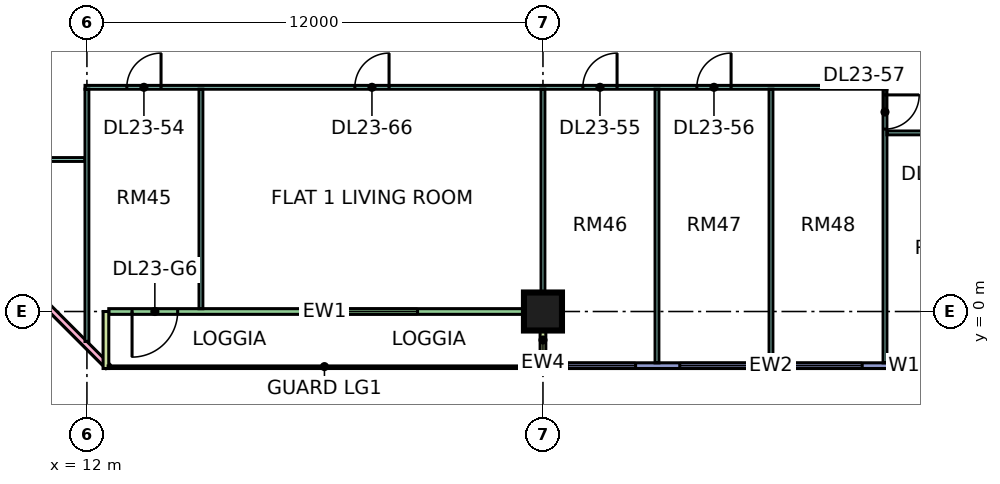
"""IFC4 building model, lengths in metres.
Left out: names, types, materials, properties, quantities, classifications, styles, units other than length and angle.
Written with IfcOpenShell. Run it as: python <this file> out.ifc"""

import sys

from ifc_helpers import new_model, si_unit, direction, frame, frame_2d, origin, origin_2d, place, context, subcontext, project, spatial, rectangle, extrude, element, fill, save


model = new_model("IFC4")
c1 = context("Model", 3, precision=1e-05, world=origin(), true_north=direction((0.0, 1.0)))
c2 = subcontext(c1, "Body", "Model", "MODEL_VIEW")
j1 = project(units=[si_unit("LENGTHUNIT", "METRE"), si_unit("PLANEANGLEUNIT", "RADIAN")], contexts=[c1])
p1 = place(None, origin())
s1 = spatial("IfcSite", under=j1, at=p1, CompositionType="ELEMENT")
p2 = place(p1, origin())
s2 = spatial("IfcBuilding", under=s1, at=p2, CompositionType="ELEMENT")
p3 = place(p2, frame((0.0, 0.0, 103.15)))
s3 = spatial("IfcBuildingStorey", under=s2, at=p3, CompositionType="ELEMENT", Elevation=103.15)
p4 = place(p3, frame((24.0, 0.0, 0.0), z_axis=(0.0, 0.0, 1.0), x_axis=(1.0, 0.0, 0.0)))
e1 = element("IfcColumn", 1, at=p4, inside=s3, PredefinedType="COLUMN", context=c2, shape_type="SweptSolid", body=[
    extrude(rectangle(XDim=1.0, YDim=1.0, at=origin_2d()), origin(), (0.0, 0.0, 1.0), 3.75),
])
p5 = place(p3, frame((-1.447, 12.553, 0.0), z_axis=(0.0, 0.0, 1.0), x_axis=(0.707106781187, -0.707106781187, 0.0)))
e2 = element("IfcWall", 2, at=p5, inside=s3, PredefinedType="SOLIDWALL", context=c2, shape_type="SweptSolid", body=[
    extrude(rectangle(XDim=19.799, YDim=0.15, at=frame_2d((9.899, 0.0))), origin(), (0.0, 0.0, 1.0), 3.35),
])
p6 = place(p5, frame((2.212, 0.0, 0.45)))
e3 = element("IfcOpeningElement", 3, at=p6, cuts=e2, PredefinedType="OPENING", context=c2, shape_type="SweptSolid", body=[
    extrude(rectangle(XDim=3.0, YDim=2.4, at=frame_2d((1.5, 1.2))), frame((0.0, 0.085, 0.0), z_axis=(0.0, -1.0, 0.0), x_axis=(1.0, 0.0, 0.0)), (0.0, 0.0, 1.0), 0.17),
])
p7 = place(p5, frame((10.216, 0.0, 0.45)))
e4 = element("IfcOpeningElement", 4, at=p7, cuts=e2, PredefinedType="OPENING", context=c2, shape_type="SweptSolid", body=[
    extrude(rectangle(XDim=3.0, YDim=2.4, at=frame_2d((1.5, 1.2))), frame((0.0, 0.085, 0.0), z_axis=(0.0, -1.0, 0.0), x_axis=(1.0, 0.0, 0.0)), (0.0, 0.0, 1.0), 0.17),
])
p8 = place(p3, frame((12.575, 0.0, 0.0), z_axis=(0.0, 0.0, 1.0), x_axis=(1.0, 0.0, 0.0)))
e5 = element("IfcWall", 5, at=p8, inside=s3, PredefinedType="SOLIDWALL", context=c2, shape_type="SweptSolid", body=[
    extrude(rectangle(XDim=11.35, YDim=0.15, at=frame_2d((5.675, 0.0))), origin(), (0.0, 0.0, 1.0), 3.35),
])
p9 = place(p8, frame((0.613, 0.0, 0.0)))
e6 = element("IfcOpeningElement", 6, at=p9, cuts=e5, PredefinedType="OPENING", context=c2, shape_type="SweptSolid", body=[
    extrude(rectangle(XDim=1.2, YDim=2.4, at=frame_2d((0.6, 1.2))), frame((0.0, 0.085, 0.0), z_axis=(0.0, -1.0, 0.0), x_axis=(1.0, 0.0, 0.0)), (0.0, 0.0, 1.0), 0.17),
])
p10 = place(p8, frame((5.125, 0.0, 0.45)))
e7 = element("IfcOpeningElement", 7, at=p10, cuts=e5, PredefinedType="OPENING", context=c2, shape_type="SweptSolid", body=[
    extrude(rectangle(XDim=3.0, YDim=2.4, at=frame_2d((1.5, 1.2))), frame((0.0, 0.085, 0.0), z_axis=(0.0, -1.0, 0.0), x_axis=(1.0, 0.0, 0.0)), (0.0, 0.0, 1.0), 0.17),
])
for number, where, z_axis, x_axis in (
    (8, (12.5, -1.5, 0.0), (0.0, 0.0, 1.0), (0.0, 1.0, 0.0)),
    (9, (24.0, -1.5, 0.0), (0.0, 0.0, 1.0), (0.0, 1.0, 0.0)),
):
    element("IfcWall", number, at=place(p3, frame(where, z_axis=z_axis, x_axis=x_axis)), inside=s3, PredefinedType="SOLIDWALL", context=c2, shape_type="SweptSolid", body=[
        extrude(rectangle(XDim=1.5, YDim=0.15, at=frame_2d((0.75, 0.0))), origin(), (0.0, 0.0, 1.0), 3.35),
    ])
p11 = place(p3, frame((24.075, -1.425, 0.0), z_axis=(0.0, 0.0, 1.0), x_axis=(1.0, 0.0, 0.0)))
e10 = element("IfcWall", 10, at=p11, inside=s3, PredefinedType="SOLIDWALL", context=c2, shape_type="SweptSolid", body=[
    extrude(rectangle(XDim=11.85, YDim=0.15, at=frame_2d((5.925, 0.0))), origin(), (0.0, 0.0, 1.0), 3.35),
])
p12 = place(p11, frame((0.562, 0.0, 0.45)))
e11 = element("IfcOpeningElement", 11, at=p12, cuts=e10, PredefinedType="OPENING", context=c2, shape_type="SweptSolid", body=[
    extrude(rectangle(XDim=1.8, YDim=2.4, at=frame_2d((0.9, 1.2))), frame((0.0, 0.085, 0.0), z_axis=(0.0, -1.0, 0.0), x_axis=(1.0, 0.0, 0.0)), (0.0, 0.0, 1.0), 0.17),
])
p13 = place(p11, frame((3.525, 0.0, 0.45)))
e12 = element("IfcOpeningElement", 12, at=p13, cuts=e10, PredefinedType="OPENING", context=c2, shape_type="SweptSolid", body=[
    extrude(rectangle(XDim=1.8, YDim=2.4, at=frame_2d((0.9, 1.2))), frame((0.0, 0.085, 0.0), z_axis=(0.0, -1.0, 0.0), x_axis=(1.0, 0.0, 0.0)), (0.0, 0.0, 1.0), 0.17),
])
p14 = place(p11, frame((6.525, 0.0, 0.45)))
e13 = element("IfcOpeningElement", 13, at=p14, cuts=e10, PredefinedType="OPENING", context=c2, shape_type="SweptSolid", body=[
    extrude(rectangle(XDim=1.8, YDim=2.4, at=frame_2d((0.9, 1.2))), frame((0.0, 0.085, 0.0), z_axis=(0.0, -1.0, 0.0), x_axis=(1.0, 0.0, 0.0)), (0.0, 0.0, 1.0), 0.17),
])
p15 = place(p11, frame((9.488, 0.0, 0.45)))
e14 = element("IfcOpeningElement", 14, at=p15, cuts=e10, PredefinedType="OPENING", context=c2, shape_type="SweptSolid", body=[
    extrude(rectangle(XDim=1.8, YDim=2.4, at=frame_2d((0.9, 1.2))), frame((0.0, 0.085, 0.0), z_axis=(0.0, -1.0, 0.0), x_axis=(1.0, 0.0, 0.0)), (0.0, 0.0, 1.0), 0.17),
])
p16 = place(p3, frame((9.05, 4.0, 0.0), z_axis=(0.0, 0.0, 1.0), x_axis=(1.0, 0.0, 0.0)))
e15 = element("IfcWall", 15, at=p16, inside=s3, PredefinedType="PARTITIONING", context=c2, shape_type="SweptSolid", body=[
    extrude(rectangle(XDim=2.9, YDim=0.1, at=frame_2d((1.45, 0.0))), origin(), (0.0, 0.0, 1.0), 3.35),
])
p17 = place(p3, frame((11.95, 5.9, 0.0), z_axis=(0.0, 0.0, 1.0), x_axis=(1.0, 0.0, 0.0)))
e16 = element("IfcWall", 16, at=p17, inside=s3, PredefinedType="PARTITIONING", context=c2, shape_type="SweptSolid", body=[
    extrude(rectangle(XDim=21.1, YDim=0.1, at=frame_2d((10.55, 0.0))), origin(), (0.0, 0.0, 1.0), 3.35),
])
p18 = place(p17, frame((1.1, 0.0, 0.0)))
e17 = element("IfcOpeningElement", 17, at=p18, cuts=e16, PredefinedType="OPENING", context=c2, shape_type="SweptSolid", body=[
    extrude(rectangle(XDim=0.9, YDim=2.1, at=frame_2d((0.45, 1.05))), frame((0.0, 0.06, 0.0), z_axis=(0.0, -1.0, 0.0), x_axis=(1.0, 0.0, 0.0)), (0.0, 0.0, 1.0), 0.12),
])
p19 = place(p17, frame((13.1, 0.0, 0.0)))
e18 = element("IfcOpeningElement", 18, at=p19, cuts=e16, PredefinedType="OPENING", context=c2, shape_type="SweptSolid", body=[
    extrude(rectangle(XDim=0.9, YDim=2.1, at=frame_2d((0.45, 1.05))), frame((0.0, 0.06, 0.0), z_axis=(0.0, -1.0, 0.0), x_axis=(1.0, 0.0, 0.0)), (0.0, 0.0, 1.0), 0.12),
])
p20 = place(p17, frame((16.1, 0.0, 0.0)))
e19 = element("IfcOpeningElement", 19, at=p20, cuts=e16, PredefinedType="OPENING", context=c2, shape_type="SweptSolid", body=[
    extrude(rectangle(XDim=0.9, YDim=2.1, at=frame_2d((0.45, 1.05))), frame((0.0, 0.06, 0.0), z_axis=(0.0, -1.0, 0.0), x_axis=(1.0, 0.0, 0.0)), (0.0, 0.0, 1.0), 0.12),
])
p21 = place(p17, frame((7.1, 0.0, 0.0)))
e20 = element("IfcOpeningElement", 20, at=p21, cuts=e16, PredefinedType="OPENING", context=c2, shape_type="SweptSolid", body=[
    extrude(rectangle(XDim=0.9, YDim=2.1, at=frame_2d((0.45, 1.05))), frame((0.0, 0.06, 0.0), z_axis=(0.0, -1.0, 0.0), x_axis=(1.0, 0.0, 0.0)), (0.0, 0.0, 1.0), 0.12),
])
p22 = place(p3, frame((12.0, -0.788, 0.0), z_axis=(0.0, 0.0, 1.0), x_axis=(0.0, 1.0, 0.0)))
e21 = element("IfcWall", 21, at=p22, inside=s3, PredefinedType="PARTITIONING", context=c2, shape_type="SweptSolid", body=[
    extrude(rectangle(XDim=6.638, YDim=0.1, at=frame_2d((3.319, 0.0))), origin(), (0.0, 0.0, 1.0), 3.35),
])
p23 = place(p3, frame((15.0, 0.074, 0.0), z_axis=(0.0, 0.0, 1.0), x_axis=(0.0, 1.0, 0.0)))
e22 = element("IfcWall", 22, at=p23, inside=s3, PredefinedType="PARTITIONING", context=c2, shape_type="SweptSolid", body=[
    extrude(rectangle(XDim=5.776, YDim=0.1, at=frame_2d((2.888, 0.0))), origin(), (0.0, 0.0, 1.0), 3.35),
])
p24 = place(p3, frame((24.0, 0.0, 0.0), z_axis=(0.0, 0.0, 1.0), x_axis=(0.0, 1.0, 0.0)))
e23 = element("IfcWall", 23, at=p24, inside=s3, PredefinedType="PARTITIONING", context=c2, shape_type="SweptSolid", body=[
    extrude(rectangle(XDim=5.85, YDim=0.1, at=frame_2d((2.925, 0.0))), origin(), (0.0, 0.0, 1.0), 3.35),
])
for number, where, z_axis, x_axis in (
    (24, (27.0, -1.351, 0.0), (0.0, 0.0, 1.0), (0.0, 1.0, 0.0)),
    (25, (30.0, -1.351, 0.0), (0.0, 0.0, 1.0), (0.0, 1.0, 0.0)),
):
    element("IfcWall", number, at=place(p3, frame(where, z_axis=z_axis, x_axis=x_axis)), inside=s3, PredefinedType="PARTITIONING", context=c2, shape_type="SweptSolid", body=[
        extrude(rectangle(XDim=7.201, YDim=0.1, at=frame_2d((3.601, 0.0))), origin(), (0.0, 0.0, 1.0), 3.35),
    ])
p25 = place(p3, frame((33.0, -1.351, 0.0), z_axis=(0.0, 0.0, 1.0), x_axis=(0.0, 1.0, 0.0)))
e26 = element("IfcWall", 26, at=p25, inside=s3, PredefinedType="PARTITIONING", context=c2, shape_type="SweptSolid", body=[
    extrude(rectangle(XDim=7.201, YDim=0.1, at=frame_2d((3.601, 0.0))), origin(), (0.0, 0.0, 1.0), 3.35),
])
p26 = place(p25, frame((6.151, 0.0, 0.0)))
e27 = element("IfcOpeningElement", 27, at=p26, cuts=e26, PredefinedType="OPENING", context=c2, shape_type="SweptSolid", body=[
    extrude(rectangle(XDim=0.9, YDim=2.1, at=frame_2d((0.45, 1.05))), frame((0.0, 0.06, 0.0), z_axis=(0.0, -1.0, 0.0), x_axis=(1.0, 0.0, 0.0)), (0.0, 0.0, 1.0), 0.12),
])
p27 = place(p3, frame((33.05, 4.7, 0.0), z_axis=(0.0, 0.0, 1.0), x_axis=(1.0, 0.0, 0.0)))
e28 = element("IfcWall", 28, at=p27, inside=s3, PredefinedType="PARTITIONING", context=c2, shape_type="SweptSolid", body=[
    extrude(rectangle(XDim=20.85, YDim=0.1, at=frame_2d((10.425, 0.0))), origin(), (0.0, 0.0, 1.0), 3.35),
])
p28 = place(p27, frame((1.0, 0.0, 0.0)))
e29 = element("IfcOpeningElement", 29, at=p28, cuts=e28, PredefinedType="OPENING", context=c2, shape_type="SweptSolid", body=[
    extrude(rectangle(XDim=0.9, YDim=2.1, at=frame_2d((0.45, 1.05))), frame((0.0, 0.06, 0.0), z_axis=(0.0, -1.0, 0.0), x_axis=(1.0, 0.0, 0.0)), (0.0, 0.0, 1.0), 0.12),
])
p29 = place(p27, frame((4.0, 0.0, 0.0)))
e30 = element("IfcOpeningElement", 30, at=p29, cuts=e28, PredefinedType="OPENING", context=c2, shape_type="SweptSolid", body=[
    extrude(rectangle(XDim=0.9, YDim=2.1, at=frame_2d((0.45, 1.05))), frame((0.0, 0.06, 0.0), z_axis=(0.0, -1.0, 0.0), x_axis=(1.0, 0.0, 0.0)), (0.0, 0.0, 1.0), 0.12),
])
p30 = place(p27, frame((7.0, 0.0, 0.0)))
e31 = element("IfcOpeningElement", 31, at=p30, cuts=e28, PredefinedType="OPENING", context=c2, shape_type="SweptSolid", body=[
    extrude(rectangle(XDim=0.9, YDim=2.1, at=frame_2d((0.45, 1.05))), frame((0.0, 0.06, 0.0), z_axis=(0.0, -1.0, 0.0), x_axis=(1.0, 0.0, 0.0)), (0.0, 0.0, 1.0), 0.12),
])
p31 = place(p27, frame((19.0, 0.0, 0.0)))
e32 = element("IfcOpeningElement", 32, at=p31, cuts=e28, PredefinedType="OPENING", context=c2, shape_type="SweptSolid", body=[
    extrude(rectangle(XDim=0.9, YDim=2.1, at=frame_2d((0.45, 1.05))), frame((0.0, 0.06, 0.0), z_axis=(0.0, -1.0, 0.0), x_axis=(1.0, 0.0, 0.0)), (0.0, 0.0, 1.0), 0.12),
])
p32 = place(p27, frame((13.0, 0.0, 0.0)))
e33 = element("IfcOpeningElement", 33, at=p32, cuts=e28, PredefinedType="OPENING", context=c2, shape_type="SweptSolid", body=[
    extrude(rectangle(XDim=0.9, YDim=2.1, at=frame_2d((0.45, 1.05))), frame((0.0, 0.06, 0.0), z_axis=(0.0, -1.0, 0.0), x_axis=(1.0, 0.0, 0.0)), (0.0, 0.0, 1.0), 0.12),
])
p33 = place(p9, frame((1.2, 0.0, 0.0), z_axis=(0.0, 0.0, 1.0), x_axis=(-1.0, 0.0, 0.0)))
e34 = element("IfcDoor", 34, at=p33, inside=s3, OperationType="DOUBLE_DOOR_SINGLE_SWING", PredefinedType="DOOR", context=c2, shape_type="SweptSolid", body=[
    extrude(rectangle(XDim=1.2, YDim=2.4, at=frame_2d((0.6, 1.2))), frame((0.0, 0.025, 0.0), z_axis=(0.0, -1.0, 0.0), x_axis=(1.0, 0.0, 0.0)), (0.0, 0.0, 1.0), 0.05),
])
fill(e6, e34)
p34 = place(p10, origin())
e35 = element("IfcWindow", 35, at=p34, inside=s3, PartitioningType="SINGLE_PANEL", PredefinedType="WINDOW", context=c2, shape_type="SweptSolid", body=[
    extrude(rectangle(XDim=3.0, YDim=2.4, at=frame_2d((1.5, 1.2))), frame((0.0, 0.03, 0.0), z_axis=(0.0, -1.0, 0.0), x_axis=(1.0, 0.0, 0.0)), (0.0, 0.0, 1.0), 0.06),
])
fill(e7, e35)
p35 = place(p12, origin())
e36 = element("IfcWindow", 36, at=p35, inside=s3, PartitioningType="SINGLE_PANEL", PredefinedType="WINDOW", context=c2, shape_type="SweptSolid", body=[
    extrude(rectangle(XDim=1.8, YDim=2.4, at=frame_2d((0.9, 1.2))), frame((0.0, 0.03, 0.0), z_axis=(0.0, -1.0, 0.0), x_axis=(1.0, 0.0, 0.0)), (0.0, 0.0, 1.0), 0.06),
])
fill(e11, e36)
p36 = place(p13, origin())
e37 = element("IfcWindow", 37, at=p36, inside=s3, PartitioningType="SINGLE_PANEL", PredefinedType="WINDOW", context=c2, shape_type="SweptSolid", body=[
    extrude(rectangle(XDim=1.8, YDim=2.4, at=frame_2d((0.9, 1.2))), frame((0.0, 0.03, 0.0), z_axis=(0.0, -1.0, 0.0), x_axis=(1.0, 0.0, 0.0)), (0.0, 0.0, 1.0), 0.06),
])
fill(e12, e37)
p37 = place(p14, origin())
e38 = element("IfcWindow", 38, at=p37, inside=s3, PartitioningType="SINGLE_PANEL", PredefinedType="WINDOW", context=c2, shape_type="SweptSolid", body=[
    extrude(rectangle(XDim=1.8, YDim=2.4, at=frame_2d((0.9, 1.2))), frame((0.0, 0.03, 0.0), z_axis=(0.0, -1.0, 0.0), x_axis=(1.0, 0.0, 0.0)), (0.0, 0.0, 1.0), 0.06),
])
fill(e13, e38)
p38 = place(p15, origin())
e39 = element("IfcWindow", 39, at=p38, inside=s3, PartitioningType="SINGLE_PANEL", PredefinedType="WINDOW", context=c2, shape_type="SweptSolid", body=[
    extrude(rectangle(XDim=1.8, YDim=2.4, at=frame_2d((0.9, 1.2))), frame((0.0, 0.03, 0.0), z_axis=(0.0, -1.0, 0.0), x_axis=(1.0, 0.0, 0.0)), (0.0, 0.0, 1.0), 0.06),
])
fill(e14, e39)
p39 = place(p18, frame((0.9, 0.0, 0.0), z_axis=(0.0, 0.0, 1.0), x_axis=(-1.0, 0.0, 0.0)))
e40 = element("IfcDoor", 40, at=p39, inside=s3, OperationType="SINGLE_SWING_RIGHT", PredefinedType="DOOR", context=c2, shape_type="SweptSolid", body=[
    extrude(rectangle(XDim=0.9, YDim=2.1, at=frame_2d((0.45, 1.05))), frame((0.0, 0.025, 0.0), z_axis=(0.0, -1.0, 0.0), x_axis=(1.0, 0.0, 0.0)), (0.0, 0.0, 1.0), 0.05),
])
fill(e17, e40)
p40 = place(p19, frame((0.9, 0.0, 0.0), z_axis=(0.0, 0.0, 1.0), x_axis=(-1.0, 0.0, 0.0)))
e41 = element("IfcDoor", 41, at=p40, inside=s3, OperationType="SINGLE_SWING_RIGHT", PredefinedType="DOOR", context=c2, shape_type="SweptSolid", body=[
    extrude(rectangle(XDim=0.9, YDim=2.1, at=frame_2d((0.45, 1.05))), frame((0.0, 0.025, 0.0), z_axis=(0.0, -1.0, 0.0), x_axis=(1.0, 0.0, 0.0)), (0.0, 0.0, 1.0), 0.05),
])
fill(e18, e41)
p41 = place(p20, frame((0.9, 0.0, 0.0), z_axis=(0.0, 0.0, 1.0), x_axis=(-1.0, 0.0, 0.0)))
e42 = element("IfcDoor", 42, at=p41, inside=s3, OperationType="SINGLE_SWING_RIGHT", PredefinedType="DOOR", context=c2, shape_type="SweptSolid", body=[
    extrude(rectangle(XDim=0.9, YDim=2.1, at=frame_2d((0.45, 1.05))), frame((0.0, 0.025, 0.0), z_axis=(0.0, -1.0, 0.0), x_axis=(1.0, 0.0, 0.0)), (0.0, 0.0, 1.0), 0.05),
])
fill(e19, e42)
p42 = place(p26, origin())
e43 = element("IfcDoor", 43, at=p42, inside=s3, OperationType="SINGLE_SWING_RIGHT", PredefinedType="DOOR", context=c2, shape_type="SweptSolid", body=[
    extrude(rectangle(XDim=0.9, YDim=2.1, at=frame_2d((0.45, 1.05))), frame((0.0, 0.025, 0.0), z_axis=(0.0, -1.0, 0.0), x_axis=(1.0, 0.0, 0.0)), (0.0, 0.0, 1.0), 0.05),
])
fill(e27, e43)
p43 = place(p21, frame((0.9, 0.0, 0.0), z_axis=(0.0, 0.0, 1.0), x_axis=(-1.0, 0.0, 0.0)))
e44 = element("IfcDoor", 44, at=p43, inside=s3, OperationType="SINGLE_SWING_RIGHT", PredefinedType="DOOR", context=c2, shape_type="SweptSolid", body=[
    extrude(rectangle(XDim=0.9, YDim=2.1, at=frame_2d((0.45, 1.05))), frame((0.0, 0.025, 0.0), z_axis=(0.0, -1.0, 0.0), x_axis=(1.0, 0.0, 0.0)), (0.0, 0.0, 1.0), 0.05),
])
fill(e20, e44)
save(model, sys.argv[1])
